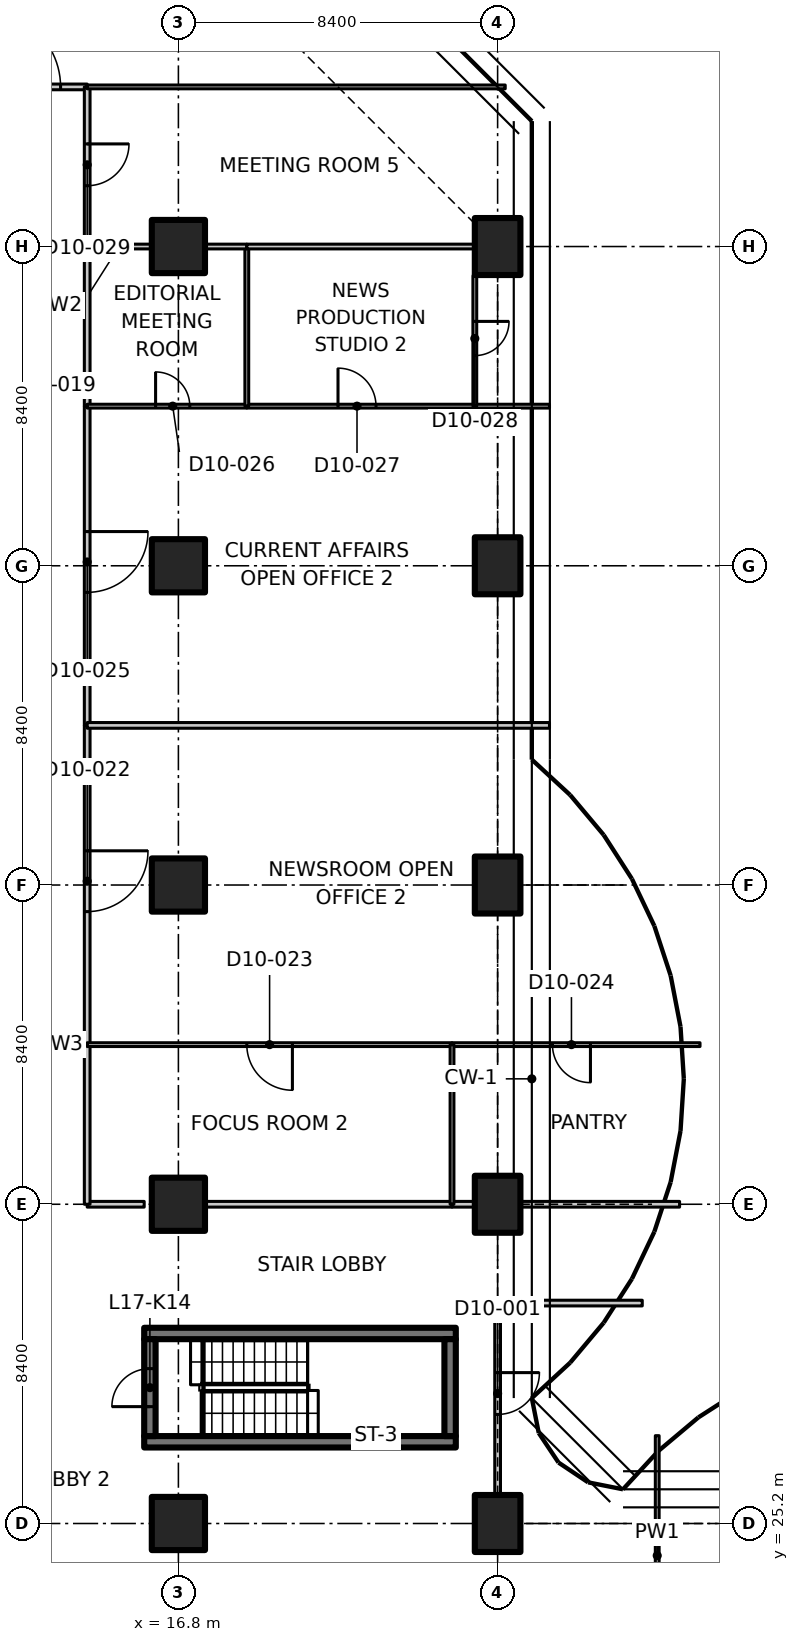
"""IFC4 building model, lengths in metres.
Left out: names, types, materials, properties, quantities, classifications, styles, units other than length and angle.
Written with IfcOpenShell. Run it as: python <this file> out.ifc"""

import sys

from ifc_helpers import new_model, si_unit, direction, frame, frame_2d, origin, origin_2d, place, context, subcontext, project, spatial, polyline, rectangle, outline, extrude, element, fill, save


model = new_model("IFC4")
c1 = context("Model", 3, precision=1e-05, world=origin(), true_north=direction((0.0, 1.0)))
c2 = subcontext(c1, "Body", "Model", "MODEL_VIEW")
j1 = project(units=[si_unit("LENGTHUNIT", "METRE"), si_unit("PLANEANGLEUNIT", "RADIAN")], contexts=[c1])
p1 = place(None, origin())
s1 = spatial("IfcSite", under=j1, at=p1, CompositionType="ELEMENT")
p2 = place(p1, origin())
s2 = spatial("IfcBuilding", under=s1, at=p2, CompositionType="ELEMENT")
p3 = place(p2, frame((0.0, 0.0, 76.1)))
s3 = spatial("IfcBuildingStorey", under=s2, at=p3, CompositionType="ELEMENT", Elevation=76.1)
for number, where, z_axis, x_axis in (
    (1, (16.8, 25.2, 0.0), (0.0, 0.0, 1.0), (1.0, 0.0, 0.0)),
    (2, (16.8, 33.6, 0.0), (0.0, 0.0, 1.0), (1.0, 0.0, 0.0)),
    (3, (16.8, 42.0, 0.0), (0.0, 0.0, 1.0), (1.0, 0.0, 0.0)),
    (4, (16.8, 50.4, 0.0), (0.0, 0.0, 1.0), (1.0, 0.0, 0.0)),
    (5, (16.8, 58.8, 0.0), (0.0, 0.0, 1.0), (1.0, 0.0, 0.0)),
):
    element("IfcColumn", number, at=place(p3, frame(where, z_axis=z_axis, x_axis=x_axis)), inside=s3, PredefinedType="COLUMN", context=c2, shape_type="SweptSolid", body=[
        extrude(rectangle(XDim=1.4, YDim=1.4, at=origin_2d()), origin(), (0.0, 0.0, 1.0), 3.35),
    ])
for number, where, z_axis, x_axis in (
    (6, (25.2, 25.2, 0.0), (0.0, 0.0, 1.0), (1.0, 0.0, 0.0)),
    (7, (25.2, 33.6, 0.0), (0.0, 0.0, 1.0), (1.0, 0.0, 0.0)),
    (8, (25.2, 42.0, 0.0), (0.0, 0.0, 1.0), (1.0, 0.0, 0.0)),
    (9, (25.2, 50.4, 0.0), (0.0, 0.0, 1.0), (1.0, 0.0, 0.0)),
    (10, (25.2, 58.8, 0.0), (0.0, 0.0, 1.0), (1.0, 0.0, 0.0)),
):
    element("IfcColumn", number, at=place(p3, frame(where, z_axis=z_axis, x_axis=x_axis)), inside=s3, PredefinedType="COLUMN", context=c2, shape_type="SweptSolid", body=[
        extrude(rectangle(XDim=1.2, YDim=1.5, at=origin_2d()), origin(), (0.0, 0.0, 1.0), 3.35),
    ])
for number, where, z_axis, x_axis in (
    (11, (15.9, 27.35, 0.0), (0.0, 0.0, 1.0), (1.0, 0.0, 0.0)),
    (12, (15.9, 30.2, 0.0), (0.0, 0.0, 1.0), (1.0, 0.0, 0.0)),
):
    element("IfcWall", number, at=place(p3, frame(where, z_axis=z_axis, x_axis=x_axis)), inside=s3, PredefinedType="SHEAR", context=c2, shape_type="SweptSolid", body=[
        extrude(rectangle(XDim=8.2, YDim=0.3, at=frame_2d((4.1, 0.0))), origin(), (0.0, 0.0, 1.0), 3.35),
    ])
p4 = place(p3, frame((16.05, 27.5, 0.0), z_axis=(0.0, 0.0, 1.0), x_axis=(0.0, 1.0, 0.0)))
e13 = element("IfcWall", 13, at=p4, inside=s3, PredefinedType="SHEAR", context=c2, shape_type="SweptSolid", body=[
    extrude(rectangle(XDim=2.55, YDim=0.3, at=frame_2d((1.275, 0.0))), origin(), (0.0, 0.0, 1.0), 3.35),
])
p5 = place(p4, frame((0.775, 0.0, 0.0)))
e14 = element("IfcOpeningElement", 14, at=p5, cuts=e13, PredefinedType="OPENING", context=c2, shape_type="SweptSolid", body=[
    extrude(rectangle(XDim=1.0, YDim=2.1, at=frame_2d((0.5, 1.05))), frame((0.0, 0.16, 0.0), z_axis=(0.0, -1.0, 0.0), x_axis=(1.0, 0.0, 0.0)), (0.0, 0.0, 1.0), 0.32),
])
p6 = place(p3, frame((23.95, 27.5, 0.0), z_axis=(0.0, 0.0, 1.0), x_axis=(0.0, 1.0, 0.0)))
e15 = element("IfcWall", 15, at=p6, inside=s3, PredefinedType="SHEAR", context=c2, shape_type="SweptSolid", body=[
    extrude(rectangle(XDim=2.55, YDim=0.3, at=frame_2d((1.275, 0.0))), origin(), (0.0, 0.0, 1.0), 3.35),
])
p7 = place(p3, frame((29.4, 27.511, 0.0), z_axis=(0.0, 0.0, 1.0), x_axis=(0.0, -1.0, 0.0)))
e16 = element("IfcWall", 16, at=p7, inside=s3, PredefinedType="PARTITIONING", context=c2, shape_type="SweptSolid", body=[
    extrude(outline(polyline([(0.0, 0.0), (6.311, 0.0), (6.311, 3.33), (2.761, 3.33), (2.759, 2.98), (1.863, 2.98), (1.861, 3.33), (0.236, 3.33), (0.0, 3.33), (0.0, 0.0)])), frame((0.0, 0.05, 0.0), z_axis=(0.0, -1.0, 0.0), x_axis=(1.0, 0.0, 0.0)), (0.0, 0.0, 1.0), 0.1),
])
p8 = place(p3, frame((25.2, 31.0, 0.0), z_axis=(0.0, 0.0, 1.0), x_axis=(0.0, -1.0, 0.0)))
e17 = element("IfcWall", 17, at=p8, inside=s3, PredefinedType="PARTITIONING", context=c2, shape_type="SweptSolid", body=[
    extrude(outline(polyline([(0.0, 0.0), (5.03, 0.0), (5.03, 2.98), (0.0, 2.98), (0.0, 0.0)])), frame((0.0, 0.075, 0.0), z_axis=(0.0, -1.0, 0.0), x_axis=(1.0, 0.0, 0.0)), (0.0, 0.0, 1.0), 0.15),
])
p9 = place(p8, frame((1.83, 0.0, 0.0)))
e18 = element("IfcOpeningElement", 18, at=p9, cuts=e17, PredefinedType="OPENING", context=c2, shape_type="SweptSolid", body=[
    extrude(rectangle(XDim=1.1, YDim=2.1, at=frame_2d((0.55, 1.05))), frame((0.0, 0.085, 0.0), z_axis=(0.0, -1.0, 0.0), x_axis=(1.0, 0.0, 0.0)), (0.0, 0.0, 1.0), 0.17),
])
p10 = place(p3, frame((25.2, 31.0, 0.0), z_axis=(0.0, 0.0, 1.0), x_axis=(1.0, 0.0, 0.0)))
e19 = element("IfcWall", 19, at=p10, inside=s3, PredefinedType="PARTITIONING", context=c2, shape_type="SweptSolid", body=[
    extrude(rectangle(XDim=3.806, YDim=0.15, at=frame_2d((1.903, 0.0))), origin(), (0.0, 0.0, 1.0), 2.98),
])
p11 = place(p3, frame((14.4, 33.6, 0.0), z_axis=(0.0, 0.0, 1.0), x_axis=(1.0, 0.0, 0.0)))
e20 = element("IfcWall", 20, at=p11, inside=s3, PredefinedType="PARTITIONING", context=c2, shape_type="SweptSolid", body=[
    extrude(rectangle(XDim=1.5, YDim=0.15, at=frame_2d((0.75, 0.0))), origin(), (0.0, 0.0, 1.0), 3.33),
])
p12 = place(p3, frame((17.52, 33.6, 0.0), z_axis=(0.0, 0.0, 1.0), x_axis=(1.0, 0.0, 0.0)))
e21 = element("IfcWall", 21, at=p12, inside=s3, PredefinedType="PARTITIONING", context=c2, shape_type="SweptSolid", body=[
    extrude(rectangle(XDim=6.48, YDim=0.15, at=frame_2d((3.24, 0.0))), origin(), (0.0, 0.0, 1.0), 3.33),
])
p13 = place(p3, frame((24.0, 33.6, 0.0), z_axis=(0.0, 0.0, 1.0), x_axis=(1.0, 0.0, 0.0)))
e22 = element("IfcWall", 22, at=p13, inside=s3, PredefinedType="PARTITIONING", context=c2, shape_type="SweptSolid", body=[
    extrude(rectangle(XDim=0.58, YDim=0.15, at=frame_2d((0.29, 0.0))), origin(), (0.0, 0.0, 1.0), 3.33),
])
p14 = place(p3, frame((25.82, 33.6, 0.0), z_axis=(0.0, 0.0, 1.0), x_axis=(1.0, 0.0, 0.0)))
e23 = element("IfcWall", 23, at=p14, inside=s3, PredefinedType="PARTITIONING", context=c2, shape_type="SweptSolid", body=[
    extrude(rectangle(XDim=4.168, YDim=0.15, at=frame_2d((2.084, 0.0))), origin(), (0.0, 0.0, 1.0), 2.98),
])
p15 = place(p3, frame((10.8, 63.0, 0.0), z_axis=(0.0, 0.0, 1.0), x_axis=(1.0, 0.0, 0.0)))
e24 = element("IfcWall", 24, at=p15, inside=s3, PredefinedType="PARTITIONING", context=c2, shape_type="SweptSolid", body=[
    extrude(rectangle(XDim=3.6, YDim=0.15, at=frame_2d((1.8, 0.0))), origin(), (0.0, 0.0, 1.0), 3.33),
])
p16 = place(p15, frame((0.9, 0.0, 0.0)))
e25 = element("IfcOpeningElement", 25, at=p16, cuts=e24, PredefinedType="OPENING", context=c2, shape_type="SweptSolid", body=[
    extrude(rectangle(XDim=2.0, YDim=2.4, at=frame_2d((1.0, 1.2))), frame((0.0, 0.085, 0.0), z_axis=(0.0, -1.0, 0.0), x_axis=(1.0, 0.0, 0.0)), (0.0, 0.0, 1.0), 0.17),
])
p17 = place(p3, frame((14.4, 46.2, 0.0), z_axis=(0.0, 0.0, 1.0), x_axis=(0.0, -1.0, 0.0)))
e26 = element("IfcWall", 26, at=p17, inside=s3, PredefinedType="PARTITIONING", context=c2, shape_type="SweptSolid", body=[
    extrude(rectangle(XDim=8.4, YDim=0.15, at=frame_2d((4.2, 0.0))), origin(), (0.0, 0.0, 1.0), 3.33),
])
p18 = place(p17, frame((3.3, 0.0, 0.0)))
e27 = element("IfcOpeningElement", 27, at=p18, cuts=e26, PredefinedType="OPENING", context=c2, shape_type="SweptSolid", body=[
    extrude(rectangle(XDim=1.6, YDim=2.1, at=frame_2d((0.8, 1.05))), frame((0.0, 0.085, 0.0), z_axis=(0.0, -1.0, 0.0), x_axis=(1.0, 0.0, 0.0)), (0.0, 0.0, 1.0), 0.17),
])
p19 = place(p3, frame((14.4, 37.8, 0.0), z_axis=(0.0, 0.0, 1.0), x_axis=(0.0, -1.0, 0.0)))
e28 = element("IfcWall", 28, at=p19, inside=s3, PredefinedType="PARTITIONING", context=c2, shape_type="SweptSolid", body=[
    extrude(rectangle(XDim=4.2, YDim=0.15, at=frame_2d((2.1, 0.0))), origin(), (0.0, 0.0, 1.0), 3.33),
])
p20 = place(p3, frame((14.4, 54.6, 0.0), z_axis=(0.0, 0.0, 1.0), x_axis=(0.0, -1.0, 0.0)))
e29 = element("IfcWall", 29, at=p20, inside=s3, PredefinedType="PARTITIONING", context=c2, shape_type="SweptSolid", body=[
    extrude(rectangle(XDim=8.4, YDim=0.15, at=frame_2d((4.2, 0.0))), origin(), (0.0, 0.0, 1.0), 3.33),
])
p21 = place(p20, frame((3.3, 0.0, 0.0)))
e30 = element("IfcOpeningElement", 30, at=p21, cuts=e29, PredefinedType="OPENING", context=c2, shape_type="SweptSolid", body=[
    extrude(rectangle(XDim=1.6, YDim=2.1, at=frame_2d((0.8, 1.05))), frame((0.0, 0.085, 0.0), z_axis=(0.0, -1.0, 0.0), x_axis=(1.0, 0.0, 0.0)), (0.0, 0.0, 1.0), 0.17),
])
p22 = place(p3, frame((14.4, 58.8, 0.0), z_axis=(0.0, 0.0, 1.0), x_axis=(0.0, -1.0, 0.0)))
e31 = element("IfcWall", 31, at=p22, inside=s3, PredefinedType="PARTITIONING", context=c2, shape_type="SweptSolid", body=[
    extrude(rectangle(XDim=4.2, YDim=0.15, at=frame_2d((2.1, 0.0))), origin(), (0.0, 0.0, 1.0), 3.33),
])
p23 = place(p3, frame((14.4, 63.0, 0.0), z_axis=(0.0, 0.0, 1.0), x_axis=(0.0, -1.0, 0.0)))
e32 = element("IfcWall", 32, at=p23, inside=s3, PredefinedType="PARTITIONING", context=c2, shape_type="SweptSolid", body=[
    extrude(rectangle(XDim=4.2, YDim=0.15, at=frame_2d((2.1, 0.0))), origin(), (0.0, 0.0, 1.0), 3.33),
])
p24 = place(p23, frame((1.5, 0.0, 0.0)))
e33 = element("IfcOpeningElement", 33, at=p24, cuts=e32, PredefinedType="OPENING", context=c2, shape_type="SweptSolid", body=[
    extrude(rectangle(XDim=1.1, YDim=2.1, at=frame_2d((0.55, 1.05))), frame((0.0, 0.085, 0.0), z_axis=(0.0, -1.0, 0.0), x_axis=(1.0, 0.0, 0.0)), (0.0, 0.0, 1.0), 0.17),
])
p25 = place(p3, frame((25.4, 63.0, 0.0), z_axis=(0.0, 0.0, 1.0), x_axis=(-1.0, 0.0, 0.0)))
e34 = element("IfcWall", 34, at=p25, inside=s3, PredefinedType="PARTITIONING", context=c2, shape_type="SweptSolid", body=[
    extrude(outline(polyline([(0.0, 0.0), (11.0, 0.0), (11.0, 3.33), (5.066, 3.33), (5.064, 2.98), (3.736, 2.98), (3.734, 3.33), (0.0, 3.33), (0.0, 0.0)])), frame((0.0, 0.05, 0.0), z_axis=(0.0, -1.0, 0.0), x_axis=(1.0, 0.0, 0.0)), (0.0, 0.0, 1.0), 0.1),
])
p26 = place(p3, frame((24.0, 37.8, 0.0), z_axis=(0.0, 0.0, 1.0), x_axis=(-1.0, 0.0, 0.0)))
e35 = element("IfcWall", 35, at=p26, inside=s3, PredefinedType="PARTITIONING", context=c2, shape_type="SweptSolid", body=[
    extrude(rectangle(XDim=9.6, YDim=0.1, at=frame_2d((4.8, 0.0))), origin(), (0.0, 0.0, 1.0), 3.33),
])
p27 = place(p26, frame((4.2, 0.0, 0.0)))
e36 = element("IfcOpeningElement", 36, at=p27, cuts=e35, PredefinedType="OPENING", context=c2, shape_type="SweptSolid", body=[
    extrude(rectangle(XDim=1.2, YDim=2.1, at=frame_2d((0.6, 1.05))), frame((0.0, 0.06, 0.0), z_axis=(0.0, -1.0, 0.0), x_axis=(1.0, 0.0, 0.0)), (0.0, 0.0, 1.0), 0.12),
])
p28 = place(p3, frame((30.526, 37.8, 0.0), z_axis=(0.0, 0.0, 1.0), x_axis=(-1.0, 0.0, 0.0)))
e37 = element("IfcWall", 37, at=p28, inside=s3, PredefinedType="PARTITIONING", context=c2, shape_type="SweptSolid", body=[
    extrude(outline(polyline([(0.0, 0.0), (6.526, 0.0), (6.526, 3.33), (5.776, 3.33), (5.774, 2.98), (4.878, 2.98), (4.876, 3.33), (0.283, 3.33), (0.0, 3.33), (0.0, 0.0)])), frame((0.0, 0.05, 0.0), z_axis=(0.0, -1.0, 0.0), x_axis=(1.0, 0.0, 0.0)), (0.0, 0.0, 1.0), 0.1),
])
p29 = place(p28, frame((2.883, 0.0, 0.0)))
e38 = element("IfcOpeningElement", 38, at=p29, cuts=e37, PredefinedType="OPENING", context=c2, shape_type="SweptSolid", body=[
    extrude(rectangle(XDim=1.0, YDim=2.1, at=frame_2d((0.5, 1.05))), frame((0.0, 0.06, 0.0), z_axis=(0.0, -1.0, 0.0), x_axis=(1.0, 0.0, 0.0)), (0.0, 0.0, 1.0), 0.12),
])
p30 = place(p3, frame((14.4, 46.2, 0.0), z_axis=(0.0, 0.0, 1.0), x_axis=(1.0, 0.0, 0.0)))
e39 = element("IfcWall", 39, at=p30, inside=s3, PredefinedType="PARTITIONING", context=c2, shape_type="SweptSolid", body=[
    extrude(outline(polyline([(0.0, 0.0), (12.165, 0.0), (12.165, 3.33), (11.9, 3.33), (11.25, 3.33), (11.248, 2.98), (10.352, 2.98), (10.35, 3.33), (0.0, 3.33), (0.0, 0.0)])), frame((0.0, 0.075, 0.0), z_axis=(0.0, -1.0, 0.0), x_axis=(1.0, 0.0, 0.0)), (0.0, 0.0, 1.0), 0.15),
])
p31 = place(p3, frame((24.0, 37.8, 0.0), z_axis=(0.0, 0.0, 1.0), x_axis=(0.0, -1.0, 0.0)))
e40 = element("IfcWall", 40, at=p31, inside=s3, PredefinedType="PARTITIONING", context=c2, shape_type="SweptSolid", body=[
    extrude(rectangle(XDim=4.2, YDim=0.1, at=frame_2d((2.1, 0.0))), origin(), (0.0, 0.0, 1.0), 3.33),
])
p32 = place(p3, frame((14.4, 54.6, 0.0), z_axis=(0.0, 0.0, 1.0), x_axis=(1.0, 0.0, 0.0)))
e41 = element("IfcWall", 41, at=p32, inside=s3, PredefinedType="PARTITIONING", context=c2, shape_type="SweptSolid", body=[
    extrude(rectangle(XDim=4.2, YDim=0.1, at=frame_2d((2.1, 0.0))), origin(), (0.0, 0.0, 1.0), 3.33),
])
p33 = place(p32, frame((1.8, 0.0, 0.0)))
e42 = element("IfcOpeningElement", 42, at=p33, cuts=e41, PredefinedType="OPENING", context=c2, shape_type="SweptSolid", body=[
    extrude(rectangle(XDim=0.9, YDim=2.1, at=frame_2d((0.45, 1.05))), frame((0.0, 0.06, 0.0), z_axis=(0.0, -1.0, 0.0), x_axis=(1.0, 0.0, 0.0)), (0.0, 0.0, 1.0), 0.12),
])
p34 = place(p3, frame((18.6, 54.6, 0.0), z_axis=(0.0, 0.0, 1.0), x_axis=(1.0, 0.0, 0.0)))
e43 = element("IfcWall", 43, at=p34, inside=s3, PredefinedType="PARTITIONING", context=c2, shape_type="SweptSolid", body=[
    extrude(rectangle(XDim=6.0, YDim=0.1, at=frame_2d((3.0, 0.0))), origin(), (0.0, 0.0, 1.0), 3.33),
])
p35 = place(p34, frame((2.4, 0.0, 0.0)))
e44 = element("IfcOpeningElement", 44, at=p35, cuts=e43, PredefinedType="OPENING", context=c2, shape_type="SweptSolid", body=[
    extrude(rectangle(XDim=1.0, YDim=2.1, at=frame_2d((0.5, 1.05))), frame((0.0, 0.06, 0.0), z_axis=(0.0, -1.0, 0.0), x_axis=(1.0, 0.0, 0.0)), (0.0, 0.0, 1.0), 0.12),
])
p36 = place(p3, frame((24.6, 54.6, 0.0), z_axis=(0.0, 0.0, 1.0), x_axis=(1.0, 0.0, 0.0)))
e45 = element("IfcWall", 45, at=p36, inside=s3, PredefinedType="PARTITIONING", context=c2, shape_type="SweptSolid", body=[
    extrude(rectangle(XDim=1.965, YDim=0.1, at=frame_2d((0.982, 0.0))), origin(), (0.0, 0.0, 1.0), 2.98),
])
p37 = place(p3, frame((18.6, 58.8, 0.0), z_axis=(0.0, 0.0, 1.0), x_axis=(0.0, -1.0, 0.0)))
e46 = element("IfcWall", 46, at=p37, inside=s3, PredefinedType="PARTITIONING", context=c2, shape_type="SweptSolid", body=[
    extrude(rectangle(XDim=4.2, YDim=0.1, at=frame_2d((2.1, 0.0))), origin(), (0.0, 0.0, 1.0), 3.33),
])
p38 = place(p3, frame((14.4, 58.8, 0.0), z_axis=(0.0, 0.0, 1.0), x_axis=(1.0, 0.0, 0.0)))
e47 = element("IfcWall", 47, at=p38, inside=s3, PredefinedType="PARTITIONING", context=c2, shape_type="SweptSolid", body=[
    extrude(rectangle(XDim=1.68, YDim=0.125, at=frame_2d((0.84, 0.0))), origin(), (0.0, 0.0, 1.0), 3.33),
])
p39 = place(p3, frame((17.52, 58.8, 0.0), z_axis=(0.0, 0.0, 1.0), x_axis=(1.0, 0.0, 0.0)))
e48 = element("IfcWall", 48, at=p39, inside=s3, PredefinedType="PARTITIONING", context=c2, shape_type="SweptSolid", body=[
    extrude(rectangle(XDim=1.08, YDim=0.125, at=frame_2d((0.54, 0.0))), origin(), (0.0, 0.0, 1.0), 3.33),
])
p40 = place(p3, frame((24.6, 58.03, 0.0), z_axis=(0.0, 0.0, 1.0), x_axis=(0.0, -1.0, 0.0)))
e49 = element("IfcWall", 49, at=p40, inside=s3, PredefinedType="PARTITIONING", context=c2, shape_type="SweptSolid", body=[
    extrude(rectangle(XDim=3.43, YDim=0.1, at=frame_2d((1.715, 0.0))), origin(), (0.0, 0.0, 1.0), 3.33),
])
p41 = place(p40, frame((1.2, 0.0, 0.0)))
e50 = element("IfcOpeningElement", 50, at=p41, cuts=e49, PredefinedType="OPENING", context=c2, shape_type="SweptSolid", body=[
    extrude(rectangle(XDim=0.9, YDim=2.1, at=frame_2d((0.45, 1.05))), frame((0.0, 0.06, 0.0), z_axis=(0.0, -1.0, 0.0), x_axis=(1.0, 0.0, 0.0)), (0.0, 0.0, 1.0), 0.12),
])
p42 = place(p3, frame((18.6, 58.8, 0.0), z_axis=(0.0, 0.0, 1.0), x_axis=(1.0, 0.0, 0.0)))
e51 = element("IfcWall", 51, at=p42, inside=s3, PredefinedType="PARTITIONING", context=c2, shape_type="SweptSolid", body=[
    extrude(rectangle(XDim=5.98, YDim=0.125, at=frame_2d((2.99, 0.0))), origin(), (0.0, 0.0, 1.0), 3.33),
])
p43 = place(p5, origin())
e52 = element("IfcDoor", 52, at=p43, inside=s3, OperationType="SINGLE_SWING_RIGHT", PredefinedType="DOOR", context=c2, shape_type="SweptSolid", body=[
    extrude(rectangle(XDim=1.0, YDim=2.1, at=frame_2d((0.5, 1.05))), frame((0.0, 0.025, 0.0), z_axis=(0.0, -1.0, 0.0), x_axis=(1.0, 0.0, 0.0)), (0.0, 0.0, 1.0), 0.05),
])
fill(e14, e52)
p44 = place(p9, origin())
e53 = element("IfcDoor", 53, at=p44, inside=s3, OperationType="SINGLE_SWING_RIGHT", PredefinedType="DOOR", context=c2, shape_type="SweptSolid", body=[
    extrude(rectangle(XDim=1.1, YDim=2.1, at=frame_2d((0.55, 1.05))), frame((0.0, 0.025, 0.0), z_axis=(0.0, -1.0, 0.0), x_axis=(1.0, 0.0, 0.0)), (0.0, 0.0, 1.0), 0.05),
])
fill(e18, e53)
p45 = place(p16, origin())
e54 = element("IfcDoor", 54, at=p45, inside=s3, OperationType="DOUBLE_DOOR_SINGLE_SWING", PredefinedType="DOOR", context=c2, shape_type="SweptSolid", body=[
    extrude(rectangle(XDim=2.0, YDim=2.4, at=frame_2d((1.0, 1.2))), frame((0.0, 0.025, 0.0), z_axis=(0.0, -1.0, 0.0), x_axis=(1.0, 0.0, 0.0)), (0.0, 0.0, 1.0), 0.05),
])
fill(e25, e54)
p46 = place(p18, origin())
e55 = element("IfcDoor", 55, at=p46, inside=s3, OperationType="DOUBLE_DOOR_SINGLE_SWING", PredefinedType="DOOR", context=c2, shape_type="SweptSolid", body=[
    extrude(rectangle(XDim=1.6, YDim=2.1, at=frame_2d((0.8, 1.05))), frame((0.0, 0.025, 0.0), z_axis=(0.0, -1.0, 0.0), x_axis=(1.0, 0.0, 0.0)), (0.0, 0.0, 1.0), 0.05),
])
fill(e27, e55)
p47 = place(p27, origin())
e56 = element("IfcDoor", 56, at=p47, inside=s3, OperationType="SINGLE_SWING_LEFT", PredefinedType="DOOR", context=c2, shape_type="SweptSolid", body=[
    extrude(rectangle(XDim=1.2, YDim=2.1, at=frame_2d((0.6, 1.05))), frame((0.0, 0.025, 0.0), z_axis=(0.0, -1.0, 0.0), x_axis=(1.0, 0.0, 0.0)), (0.0, 0.0, 1.0), 0.05),
])
fill(e36, e56)
p48 = place(p29, origin())
e57 = element("IfcDoor", 57, at=p48, inside=s3, OperationType="SINGLE_SWING_LEFT", PredefinedType="DOOR", context=c2, shape_type="SweptSolid", body=[
    extrude(rectangle(XDim=1.0, YDim=2.1, at=frame_2d((0.5, 1.05))), frame((0.0, 0.025, 0.0), z_axis=(0.0, -1.0, 0.0), x_axis=(1.0, 0.0, 0.0)), (0.0, 0.0, 1.0), 0.05),
])
fill(e38, e57)
p49 = place(p21, origin())
e58 = element("IfcDoor", 58, at=p49, inside=s3, OperationType="DOUBLE_DOOR_SINGLE_SWING", PredefinedType="DOOR", context=c2, shape_type="SweptSolid", body=[
    extrude(rectangle(XDim=1.6, YDim=2.1, at=frame_2d((0.8, 1.05))), frame((0.0, 0.025, 0.0), z_axis=(0.0, -1.0, 0.0), x_axis=(1.0, 0.0, 0.0)), (0.0, 0.0, 1.0), 0.05),
])
fill(e30, e58)
p50 = place(p33, origin())
e59 = element("IfcDoor", 59, at=p50, inside=s3, OperationType="SINGLE_SWING_LEFT", PredefinedType="DOOR", context=c2, shape_type="SweptSolid", body=[
    extrude(rectangle(XDim=0.9, YDim=2.1, at=frame_2d((0.45, 1.05))), frame((0.0, 0.025, 0.0), z_axis=(0.0, -1.0, 0.0), x_axis=(1.0, 0.0, 0.0)), (0.0, 0.0, 1.0), 0.05),
])
fill(e42, e59)
p51 = place(p35, origin())
e60 = element("IfcDoor", 60, at=p51, inside=s3, OperationType="SINGLE_SWING_LEFT", PredefinedType="DOOR", context=c2, shape_type="SweptSolid", body=[
    extrude(rectangle(XDim=1.0, YDim=2.1, at=frame_2d((0.5, 1.05))), frame((0.0, 0.025, 0.0), z_axis=(0.0, -1.0, 0.0), x_axis=(1.0, 0.0, 0.0)), (0.0, 0.0, 1.0), 0.05),
])
fill(e44, e60)
p52 = place(p41, origin())
e61 = element("IfcDoor", 61, at=p52, inside=s3, OperationType="SINGLE_SWING_LEFT", PredefinedType="DOOR", context=c2, shape_type="SweptSolid", body=[
    extrude(rectangle(XDim=0.9, YDim=2.1, at=frame_2d((0.45, 1.05))), frame((0.0, 0.025, 0.0), z_axis=(0.0, -1.0, 0.0), x_axis=(1.0, 0.0, 0.0)), (0.0, 0.0, 1.0), 0.05),
])
fill(e50, e61)
p53 = place(p24, origin())
e62 = element("IfcDoor", 62, at=p53, inside=s3, OperationType="SINGLE_SWING_LEFT", PredefinedType="DOOR", context=c2, shape_type="SweptSolid", body=[
    extrude(rectangle(XDim=1.1, YDim=2.1, at=frame_2d((0.55, 1.05))), frame((0.0, 0.025, 0.0), z_axis=(0.0, -1.0, 0.0), x_axis=(1.0, 0.0, 0.0)), (0.0, 0.0, 1.0), 0.05),
])
fill(e33, e62)
save(model, sys.argv[1])
